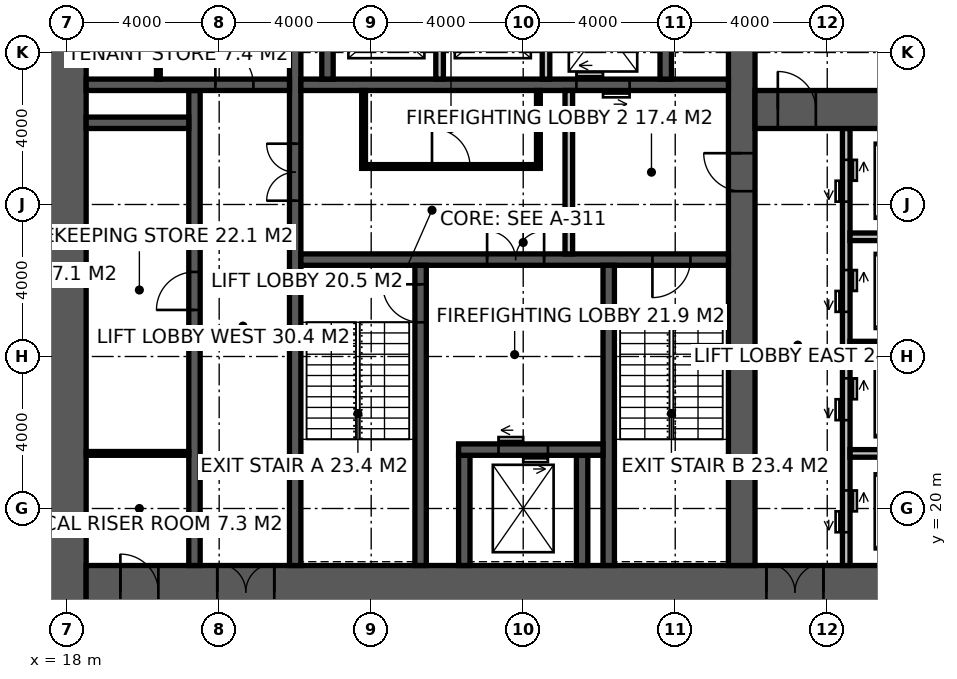
"""IFC4 building model, lengths in metres.
Left out: names, types, materials, properties, quantities, classifications, styles, units other than length and angle.
Written with IfcOpenShell. Run it as: python <this file> out.ifc"""

import sys

from ifc_helpers import new_model, si_unit, direction, frame, frame_2d, origin, place, context, subcontext, project, spatial, rectangle, extrude, element, fill, save


model = new_model("IFC4")
c1 = context("Model", 3, precision=1e-05, world=origin(), true_north=direction((0.0, 1.0)))
c2 = subcontext(c1, "Body", "Model", "MODEL_VIEW")
j1 = project(units=[si_unit("LENGTHUNIT", "METRE"), si_unit("PLANEANGLEUNIT", "RADIAN")], contexts=[c1])
p1 = place(None, origin())
s1 = spatial("IfcSite", under=j1, at=p1, CompositionType="ELEMENT")
p2 = place(p1, origin())
s2 = spatial("IfcBuilding", under=s1, at=p2, CompositionType="ELEMENT")
p3 = place(p2, frame((0.0, 0.0, 15.0)))
s3 = spatial("IfcBuildingStorey", under=s2, at=p3, CompositionType="ELEMENT", Elevation=15.0)
p4 = place(p3, frame((18.0, 17.1, -0.15), z_axis=(0.0, 0.0, 1.0), x_axis=(0.0, 1.0, 0.0)))
e1 = element("IfcWall", 1, at=p4, inside=s3, PredefinedType="SHEAR", context=c2, shape_type="SweptSolid", body=[
    extrude(rectangle(XDim=19.8, YDim=1.0, at=frame_2d((9.9, 0.0))), origin(), (0.0, 0.0, 1.0), 4.0),
])
p5 = place(p3, frame((18.5, 17.8, -0.15), z_axis=(0.0, 0.0, 1.0), x_axis=(1.0, 0.0, 0.0)))
e2 = element("IfcWall", 2, at=p5, inside=s3, PredefinedType="SHEAR", context=c2, shape_type="SweptSolid", body=[
    extrude(rectangle(XDim=23.0, YDim=1.4, at=frame_2d((11.5, 0.0))), origin(), (0.0, 0.0, 1.0), 4.0),
])
p6 = place(p5, frame((3.45, 0.0, 0.15)))
e3 = element("IfcOpeningElement", 3, at=p6, cuts=e2, PredefinedType="OPENING", context=c2, shape_type="SweptSolid", body=[
    extrude(rectangle(XDim=1.5, YDim=2.4, at=frame_2d((0.75, 1.2))), frame((0.0, 0.71, 0.0), z_axis=(0.0, -1.0, 0.0), x_axis=(1.0, 0.0, 0.0)), (0.0, 0.0, 1.0), 1.42),
])
p7 = place(p5, frame((17.9, 0.0, 0.15)))
e4 = element("IfcOpeningElement", 4, at=p7, cuts=e2, PredefinedType="OPENING", context=c2, shape_type="SweptSolid", body=[
    extrude(rectangle(XDim=1.5, YDim=2.4, at=frame_2d((0.75, 1.2))), frame((0.0, 0.71, 0.0), z_axis=(0.0, -1.0, 0.0), x_axis=(1.0, 0.0, 0.0)), (0.0, 0.0, 1.0), 1.42),
])
p8 = place(p5, frame((0.9, 0.0, 0.15)))
e5 = element("IfcOpeningElement", 5, at=p8, cuts=e2, PredefinedType="OPENING", context=c2, shape_type="SweptSolid", body=[
    extrude(rectangle(XDim=1.0, YDim=2.2, at=frame_2d((0.5, 1.1))), frame((0.0, 0.71, 0.0), z_axis=(0.0, -1.0, 0.0), x_axis=(1.0, 0.0, 0.0)), (0.0, 0.0, 1.0), 1.42),
])
p9 = place(p3, frame((35.75, 18.5, -0.15), z_axis=(0.0, 0.0, 1.0), x_axis=(0.0, 1.0, 0.0)))
e6 = element("IfcWall", 6, at=p9, inside=s3, PredefinedType="SHEAR", context=c2, shape_type="SweptSolid", body=[
    extrude(rectangle(XDim=17.0, YDim=0.7, at=frame_2d((8.5, 0.0))), origin(), (0.0, 0.0, 1.0), 4.0),
])
p10 = place(p9, frame((9.85, 0.0, 0.15)))
e7 = element("IfcOpeningElement", 7, at=p10, cuts=e6, PredefinedType="OPENING", context=c2, shape_type="SweptSolid", body=[
    extrude(rectangle(XDim=1.0, YDim=2.2, at=frame_2d((0.5, 1.1))), frame((0.0, 0.36, 0.0), z_axis=(0.0, -1.0, 0.0), x_axis=(1.0, 0.0, 0.0)), (0.0, 0.0, 1.0), 0.72),
])
p11 = place(p3, frame((24.0, 18.5, -0.15), z_axis=(0.0, 0.0, 1.0), x_axis=(0.0, 1.0, 0.0)))
e8 = element("IfcWall", 8, at=p11, inside=s3, PredefinedType="SHEAR", context=c2, shape_type="SweptSolid", body=[
    extrude(rectangle(XDim=17.0, YDim=0.3, at=frame_2d((8.5, 0.0))), origin(), (0.0, 0.0, 1.0), 4.0),
])
p12 = place(p11, frame((9.6, 0.0, 0.15)))
e9 = element("IfcOpeningElement", 9, at=p12, cuts=e8, PredefinedType="OPENING", context=c2, shape_type="SweptSolid", body=[
    extrude(rectangle(XDim=1.5, YDim=2.4, at=frame_2d((0.75, 1.2))), frame((0.0, 0.16, 0.0), z_axis=(0.0, -1.0, 0.0), x_axis=(1.0, 0.0, 0.0)), (0.0, 0.0, 1.0), 0.32),
])
p13 = place(p3, frame((24.15, 26.55, -0.15), z_axis=(0.0, 0.0, 1.0), x_axis=(1.0, 0.0, 0.0)))
e10 = element("IfcWall", 10, at=p13, inside=s3, PredefinedType="SHEAR", context=c2, shape_type="SweptSolid", body=[
    extrude(rectangle(XDim=11.25, YDim=0.3, at=frame_2d((5.625, 0.0))), origin(), (0.0, 0.0, 1.0), 4.0),
])
p14 = place(p13, frame((9.25, 0.0, 0.15)))
e11 = element("IfcOpeningElement", 11, at=p14, cuts=e10, PredefinedType="OPENING", context=c2, shape_type="SweptSolid", body=[
    extrude(rectangle(XDim=1.0, YDim=2.2, at=frame_2d((0.5, 1.1))), frame((0.0, 0.16, 0.0), z_axis=(0.0, -1.0, 0.0), x_axis=(1.0, 0.0, 0.0)), (0.0, 0.0, 1.0), 0.32),
])
p15 = place(p13, frame((4.9, 0.0, 0.15)))
e12 = element("IfcOpeningElement", 12, at=p15, cuts=e10, PredefinedType="OPENING", context=c2, shape_type="SweptSolid", body=[
    extrude(rectangle(XDim=1.5, YDim=2.4, at=frame_2d((0.75, 1.2))), frame((0.0, 0.16, 0.0), z_axis=(0.0, -1.0, 0.0), x_axis=(1.0, 0.0, 0.0)), (0.0, 0.0, 1.0), 0.32),
])
p16 = place(p3, frame((27.3, 18.5, -0.15), z_axis=(0.0, 0.0, 1.0), x_axis=(0.0, 1.0, 0.0)))
e13 = element("IfcWall", 13, at=p16, inside=s3, PredefinedType="SHEAR", context=c2, shape_type="SweptSolid", body=[
    extrude(rectangle(XDim=7.9, YDim=0.3, at=frame_2d((3.95, 0.0))), origin(), (0.0, 0.0, 1.0), 4.0),
])
p17 = place(p16, frame((6.4, 0.0, 0.15)))
e14 = element("IfcOpeningElement", 14, at=p17, cuts=e13, PredefinedType="OPENING", context=c2, shape_type="SweptSolid", body=[
    extrude(rectangle(XDim=1.0, YDim=2.2, at=frame_2d((0.5, 1.1))), frame((0.0, 0.16, 0.0), z_axis=(0.0, -1.0, 0.0), x_axis=(1.0, 0.0, 0.0)), (0.0, 0.0, 1.0), 0.32),
])
p18 = place(p3, frame((32.25, 18.5, -0.15), z_axis=(0.0, 0.0, 1.0), x_axis=(0.0, 1.0, 0.0)))
e15 = element("IfcWall", 15, at=p18, inside=s3, PredefinedType="SHEAR", context=c2, shape_type="SweptSolid", body=[
    extrude(rectangle(XDim=7.9, YDim=0.3, at=frame_2d((3.95, 0.0))), origin(), (0.0, 0.0, 1.0), 4.0),
])
for number, where, z_axis, x_axis in (
    (16, (28.45, 18.5, -0.15), (0.0, 0.0, 1.0), (0.0, 1.0, 0.0)),
    (17, (31.55, 18.5, -0.15), (0.0, 0.0, 1.0), (0.0, 1.0, 0.0)),
):
    element("IfcWall", number, at=place(p3, frame(where, z_axis=z_axis, x_axis=x_axis)), inside=s3, PredefinedType="SHEAR", context=c2, shape_type="SweptSolid", body=[
        extrude(rectangle(XDim=2.9, YDim=0.3, at=frame_2d((1.45, 0.0))), origin(), (0.0, 0.0, 1.0), 4.0),
    ])
p19 = place(p3, frame((28.3, 21.55, -0.15), z_axis=(0.0, 0.0, 1.0), x_axis=(1.0, 0.0, 0.0)))
e18 = element("IfcWall", 18, at=p19, inside=s3, PredefinedType="SHEAR", context=c2, shape_type="SweptSolid", body=[
    extrude(rectangle(XDim=3.8, YDim=0.3, at=frame_2d((1.9, 0.0))), origin(), (0.0, 0.0, 1.0), 4.0),
])
p20 = place(p19, frame((1.05, 0.0, 0.15)))
e19 = element("IfcOpeningElement", 19, at=p20, cuts=e18, PredefinedType="OPENING", context=c2, shape_type="SweptSolid", body=[
    extrude(rectangle(XDim=1.3, YDim=2.4, at=frame_2d((0.65, 1.2))), frame((0.0, 0.16, 0.0), z_axis=(0.0, -1.0, 0.0), x_axis=(1.0, 0.0, 0.0)), (0.0, 0.0, 1.0), 0.32),
])
p21 = place(p3, frame((24.15, 31.15, -0.15), z_axis=(0.0, 0.0, 1.0), x_axis=(1.0, 0.0, 0.0)))
e20 = element("IfcWall", 20, at=p21, inside=s3, PredefinedType="SHEAR", context=c2, shape_type="SweptSolid", body=[
    extrude(rectangle(XDim=11.25, YDim=0.3, at=frame_2d((5.625, 0.0))), origin(), (0.0, 0.0, 1.0), 4.0),
])
p22 = place(p21, frame((7.25, 0.0, 0.15)))
e21 = element("IfcOpeningElement", 21, at=p22, cuts=e20, PredefinedType="OPENING", context=c2, shape_type="SweptSolid", body=[
    extrude(rectangle(XDim=1.4, YDim=2.4, at=frame_2d((0.7, 1.2))), frame((0.0, 0.16, 0.0), z_axis=(0.0, -1.0, 0.0), x_axis=(1.0, 0.0, 0.0)), (0.0, 0.0, 1.0), 0.32),
])
p23 = place(p3, frame((21.35, 18.5, -0.15), z_axis=(0.0, 0.0, 1.0), x_axis=(0.0, 1.0, 0.0)))
e22 = element("IfcWall", 22, at=p23, inside=s3, PredefinedType="SHEAR", context=c2, shape_type="SweptSolid", body=[
    extrude(rectangle(XDim=12.5, YDim=0.3, at=frame_2d((6.25, 0.0))), origin(), (0.0, 0.0, 1.0), 4.0),
])
p24 = place(p23, frame((6.725, 0.0, 0.15)))
e23 = element("IfcOpeningElement", 23, at=p24, cuts=e22, PredefinedType="OPENING", context=c2, shape_type="SweptSolid", body=[
    extrude(rectangle(XDim=1.0, YDim=2.2, at=frame_2d((0.5, 1.1))), frame((0.0, 0.16, 0.0), z_axis=(0.0, -1.0, 0.0), x_axis=(1.0, 0.0, 0.0)), (0.0, 0.0, 1.0), 0.32),
])
p25 = place(p3, frame((18.5, 31.15, -0.15), z_axis=(0.0, 0.0, 1.0), x_axis=(1.0, 0.0, 0.0)))
e24 = element("IfcWall", 24, at=p25, inside=s3, PredefinedType="SHEAR", context=c2, shape_type="SweptSolid", body=[
    extrude(rectangle(XDim=5.35, YDim=0.3, at=frame_2d((2.675, 0.0))), origin(), (0.0, 0.0, 1.0), 4.0),
])
p26 = place(p25, frame((3.4, 0.0, 0.15)))
e25 = element("IfcOpeningElement", 25, at=p26, cuts=e24, PredefinedType="OPENING", context=c2, shape_type="SweptSolid", body=[
    extrude(rectangle(XDim=1.0, YDim=2.2, at=frame_2d((0.5, 1.1))), frame((0.0, 0.16, 0.0), z_axis=(0.0, -1.0, 0.0), x_axis=(1.0, 0.0, 0.0)), (0.0, 0.0, 1.0), 0.32),
])
p27 = place(p3, frame((18.5, 30.15, -0.15), z_axis=(0.0, 0.0, 1.0), x_axis=(1.0, 0.0, 0.0)))
e26 = element("IfcWall", 26, at=p27, inside=s3, PredefinedType="SHEAR", context=c2, shape_type="SweptSolid", body=[
    extrude(rectangle(XDim=2.7, YDim=0.3, at=frame_2d((1.35, 0.0))), origin(), (0.0, 0.0, 1.0), 4.0),
])
for number, where, z_axis, x_axis in (
    (27, (24.85, 31.3, -0.15), (0.0, 0.0, 1.0), (0.0, 1.0, 0.0)),
    (28, (33.75, 31.3, -0.15), (0.0, 0.0, 1.0), (0.0, 1.0, 0.0)),
):
    element("IfcWall", number, at=place(p3, frame(where, z_axis=z_axis, x_axis=x_axis)), inside=s3, PredefinedType="SHEAR", context=c2, shape_type="SweptSolid", body=[
        extrude(rectangle(XDim=4.2, YDim=0.3, at=frame_2d((2.1, 0.0))), origin(), (0.0, 0.0, 1.0), 4.0),
    ])
for number, where, z_axis, x_axis in (
    (29, (27.8, 31.3, -0.15), (0.0, 0.0, 1.0), (0.0, 1.0, 0.0)),
    (30, (30.6, 31.3, -0.15), (0.0, 0.0, 1.0), (0.0, 1.0, 0.0)),
):
    element("IfcWall", number, at=place(p3, frame(where, z_axis=z_axis, x_axis=x_axis)), inside=s3, PredefinedType="SOLIDWALL", context=c2, shape_type="SweptSolid", body=[
        extrude(rectangle(XDim=2.8, YDim=0.2, at=frame_2d((1.4, 0.0))), origin(), (0.0, 0.0, 1.0), 4.0),
    ])
p28 = place(p3, frame((38.5, 18.5, -0.15), z_axis=(0.0, 0.0, 1.0), x_axis=(0.0, 1.0, 0.0)))
e31 = element("IfcWall", 31, at=p28, inside=s3, PredefinedType="SOLIDWALL", context=c2, shape_type="SweptSolid", body=[
    extrude(rectangle(XDim=11.5, YDim=0.2, at=frame_2d((5.75, 0.0))), origin(), (0.0, 0.0, 1.0), 4.0),
])
p29 = place(p28, frame((0.875, 0.0, 0.15)))
e32 = element("IfcOpeningElement", 32, at=p29, cuts=e31, PredefinedType="OPENING", context=c2, shape_type="SweptSolid", body=[
    extrude(rectangle(XDim=1.1, YDim=2.2, at=frame_2d((0.55, 1.1))), frame((0.0, 0.11, 0.0), z_axis=(0.0, -1.0, 0.0), x_axis=(1.0, 0.0, 0.0)), (0.0, 0.0, 1.0), 0.22),
])
p30 = place(p28, frame((3.825, 0.0, 0.15)))
e33 = element("IfcOpeningElement", 33, at=p30, cuts=e31, PredefinedType="OPENING", context=c2, shape_type="SweptSolid", body=[
    extrude(rectangle(XDim=1.1, YDim=2.2, at=frame_2d((0.55, 1.1))), frame((0.0, 0.11, 0.0), z_axis=(0.0, -1.0, 0.0), x_axis=(1.0, 0.0, 0.0)), (0.0, 0.0, 1.0), 0.22),
])
p31 = place(p28, frame((6.675, 0.0, 0.15)))
e34 = element("IfcOpeningElement", 34, at=p31, cuts=e31, PredefinedType="OPENING", context=c2, shape_type="SweptSolid", body=[
    extrude(rectangle(XDim=1.1, YDim=2.2, at=frame_2d((0.55, 1.1))), frame((0.0, 0.11, 0.0), z_axis=(0.0, -1.0, 0.0), x_axis=(1.0, 0.0, 0.0)), (0.0, 0.0, 1.0), 0.22),
])
p32 = place(p28, frame((9.575, 0.0, 0.15)))
e35 = element("IfcOpeningElement", 35, at=p32, cuts=e31, PredefinedType="OPENING", context=c2, shape_type="SweptSolid", body=[
    extrude(rectangle(XDim=1.1, YDim=2.2, at=frame_2d((0.55, 1.1))), frame((0.0, 0.11, 0.0), z_axis=(0.0, -1.0, 0.0), x_axis=(1.0, 0.0, 0.0)), (0.0, 0.0, 1.0), 0.22),
])
p33 = place(p3, frame((36.1, 30.5, -0.15), z_axis=(0.0, 0.0, 1.0), x_axis=(1.0, 0.0, 0.0)))
e36 = element("IfcWall", 36, at=p33, inside=s3, PredefinedType="SHEAR", context=c2, shape_type="SweptSolid", body=[
    extrude(rectangle(XDim=5.4, YDim=1.0, at=frame_2d((2.7, 0.0))), origin(), (0.0, 0.0, 1.0), 4.0),
])
p34 = place(p33, frame((0.6, 0.0, 0.15)))
e37 = element("IfcOpeningElement", 37, at=p34, cuts=e36, PredefinedType="OPENING", context=c2, shape_type="SweptSolid", body=[
    extrude(rectangle(XDim=1.0, YDim=2.2, at=frame_2d((0.5, 1.1))), frame((0.0, 0.51, 0.0), z_axis=(0.0, -1.0, 0.0), x_axis=(1.0, 0.0, 0.0)), (0.0, 0.0, 1.0), 1.02),
])
for number, where, z_axis, x_axis in (
    (38, (38.6, 21.45, -0.15), (0.0, 0.0, 1.0), (1.0, 0.0, 0.0)),
    (39, (38.6, 24.3, -0.15), (0.0, 0.0, 1.0), (1.0, 0.0, 0.0)),
    (40, (38.6, 27.15, -0.15), (0.0, 0.0, 1.0), (1.0, 0.0, 0.0)),
):
    element("IfcWall", number, at=place(p3, frame(where, z_axis=z_axis, x_axis=x_axis)), inside=s3, PredefinedType="SOLIDWALL", context=c2, shape_type="SweptSolid", body=[
        extrude(rectangle(XDim=2.9, YDim=0.2, at=frame_2d((1.45, 0.0))), origin(), (0.0, 0.0, 1.0), 4.0),
    ])
p35 = place(p3, frame((31.2, 26.7, 0.0), z_axis=(0.0, 0.0, 1.0), x_axis=(0.0, 1.0, 0.0)))
e41 = element("IfcWall", 41, at=p35, inside=s3, PredefinedType="SOLIDWALL", context=c2, shape_type="SweptSolid", body=[
    extrude(rectangle(XDim=4.3, YDim=0.2, at=frame_2d((2.15, 0.0))), origin(), (0.0, 0.0, 1.0), 3.85),
])
p36 = place(p3, frame((20.4, 31.3, 0.0), z_axis=(0.0, 0.0, 1.0), x_axis=(0.0, 1.0, 0.0)))
e42 = element("IfcWall", 42, at=p36, inside=s3, PredefinedType="PARTITIONING", context=c2, shape_type="SweptSolid", body=[
    extrude(rectangle(XDim=4.2, YDim=0.1, at=frame_2d((2.1, 0.0))), origin(), (0.0, 0.0, 1.0), 3.85),
])
p37 = place(p36, frame((1.55, 0.0, 0.0)))
e43 = element("IfcOpeningElement", 43, at=p37, cuts=e42, PredefinedType="OPENING", context=c2, shape_type="SweptSolid", body=[
    extrude(rectangle(XDim=1.0, YDim=2.2, at=frame_2d((0.5, 1.1))), frame((0.0, 0.06, 0.0), z_axis=(0.0, -1.0, 0.0), x_axis=(1.0, 0.0, 0.0)), (0.0, 0.0, 1.0), 0.12),
])
p38 = place(p3, frame((25.75, 29.0, 0.0), z_axis=(0.0, 0.0, 1.0), x_axis=(1.0, 0.0, 0.0)))
e44 = element("IfcWall", 44, at=p38, inside=s3, PredefinedType="PARTITIONING", context=c2, shape_type="SweptSolid", body=[
    extrude(rectangle(XDim=4.7, YDim=0.1, at=frame_2d((2.35, 0.0))), origin(), (0.0, 0.0, 1.0), 3.85),
])
p39 = place(p38, frame((1.85, 0.0, 0.0)))
e45 = element("IfcOpeningElement", 45, at=p39, cuts=e44, PredefinedType="OPENING", context=c2, shape_type="SweptSolid", body=[
    extrude(rectangle(XDim=1.0, YDim=2.2, at=frame_2d((0.5, 1.1))), frame((0.0, 0.06, 0.0), z_axis=(0.0, -1.0, 0.0), x_axis=(1.0, 0.0, 0.0)), (0.0, 0.0, 1.0), 0.12),
])
for number, where, z_axis, x_axis in (
    (46, (25.8, 29.05, 0.0), (0.0, 0.0, 1.0), (0.0, 1.0, 0.0)),
    (47, (30.4, 29.05, 0.0), (0.0, 0.0, 1.0), (0.0, 1.0, 0.0)),
):
    element("IfcWall", number, at=place(p3, frame(where, z_axis=z_axis, x_axis=x_axis)), inside=s3, PredefinedType="PARTITIONING", context=c2, shape_type="SweptSolid", body=[
        extrude(rectangle(XDim=1.95, YDim=0.1, at=frame_2d((0.975, 0.0))), origin(), (0.0, 0.0, 1.0), 3.85),
    ])
p40 = place(p3, frame((18.5, 21.45, 0.0), z_axis=(0.0, 0.0, 1.0), x_axis=(1.0, 0.0, 0.0)))
e48 = element("IfcWall", 48, at=p40, inside=s3, PredefinedType="PARTITIONING", context=c2, shape_type="SweptSolid", body=[
    extrude(rectangle(XDim=2.7, YDim=0.1, at=frame_2d((1.35, 0.0))), origin(), (0.0, 0.0, 1.0), 3.85),
])
p41 = place(p17, origin())
e49 = element("IfcDoor", 49, at=p41, inside=s3, OperationType="SINGLE_SWING_RIGHT", PredefinedType="DOOR", context=c2, shape_type="SweptSolid", body=[
    extrude(rectangle(XDim=1.0, YDim=2.2, at=frame_2d((0.5, 1.1))), frame((0.0, 0.025, 0.0), z_axis=(0.0, -1.0, 0.0), x_axis=(1.0, 0.0, 0.0)), (0.0, 0.0, 1.0), 0.05),
])
fill(e14, e49)
p42 = place(p14, frame((1.0, 0.0, 0.0), z_axis=(0.0, 0.0, 1.0), x_axis=(-1.0, 0.0, 0.0)))
e50 = element("IfcDoor", 50, at=p42, inside=s3, OperationType="SINGLE_SWING_RIGHT", PredefinedType="DOOR", context=c2, shape_type="SweptSolid", body=[
    extrude(rectangle(XDim=1.0, YDim=2.2, at=frame_2d((0.5, 1.1))), frame((0.0, 0.025, 0.0), z_axis=(0.0, -1.0, 0.0), x_axis=(1.0, 0.0, 0.0)), (0.0, 0.0, 1.0), 0.05),
])
fill(e11, e50)
p43 = place(p10, origin())
e51 = element("IfcDoor", 51, at=p43, inside=s3, OperationType="SINGLE_SWING_RIGHT", PredefinedType="DOOR", context=c2, shape_type="SweptSolid", body=[
    extrude(rectangle(XDim=1.0, YDim=2.2, at=frame_2d((0.5, 1.1))), frame((0.0, 0.025, 0.0), z_axis=(0.0, -1.0, 0.0), x_axis=(1.0, 0.0, 0.0)), (0.0, 0.0, 1.0), 0.05),
])
fill(e7, e51)
p44 = place(p15, origin())
e52 = element("IfcDoor", 52, at=p44, inside=s3, OperationType="DOUBLE_DOOR_DOUBLE_SWING", PredefinedType="DOOR", context=c2, shape_type="SweptSolid", body=[
    extrude(rectangle(XDim=1.5, YDim=2.4, at=frame_2d((0.75, 1.2))), frame((0.0, 0.025, 0.0), z_axis=(0.0, -1.0, 0.0), x_axis=(1.0, 0.0, 0.0)), (0.0, 0.0, 1.0), 0.05),
])
fill(e12, e52)
p45 = place(p12, origin())
e53 = element("IfcDoor", 53, at=p45, inside=s3, OperationType="DOUBLE_DOOR_DOUBLE_SWING", PredefinedType="DOOR", context=c2, shape_type="SweptSolid", body=[
    extrude(rectangle(XDim=1.5, YDim=2.4, at=frame_2d((0.75, 1.2))), frame((0.0, 0.025, 0.0), z_axis=(0.0, -1.0, 0.0), x_axis=(1.0, 0.0, 0.0)), (0.0, 0.0, 1.0), 0.05),
])
fill(e9, e53)
p46 = place(p26, origin())
e54 = element("IfcDoor", 54, at=p46, inside=s3, OperationType="SINGLE_SWING_LEFT", PredefinedType="DOOR", context=c2, shape_type="SweptSolid", body=[
    extrude(rectangle(XDim=1.0, YDim=2.2, at=frame_2d((0.5, 1.1))), frame((0.0, 0.025, 0.0), z_axis=(0.0, -1.0, 0.0), x_axis=(1.0, 0.0, 0.0)), (0.0, 0.0, 1.0), 0.05),
])
fill(e25, e54)
p47 = place(p39, origin())
e55 = element("IfcDoor", 55, at=p47, inside=s3, OperationType="SINGLE_SWING_LEFT", PredefinedType="DOOR", context=c2, shape_type="SweptSolid", body=[
    extrude(rectangle(XDim=1.0, YDim=2.2, at=frame_2d((0.5, 1.1))), frame((0.0, 0.025, 0.0), z_axis=(0.0, -1.0, 0.0), x_axis=(1.0, 0.0, 0.0)), (0.0, 0.0, 1.0), 0.05),
])
fill(e45, e55)
p48 = place(p24, origin())
e56 = element("IfcDoor", 56, at=p48, inside=s3, OperationType="SINGLE_SWING_LEFT", PredefinedType="DOOR", context=c2, shape_type="SweptSolid", body=[
    extrude(rectangle(XDim=1.0, YDim=2.2, at=frame_2d((0.5, 1.1))), frame((0.0, 0.025, 0.0), z_axis=(0.0, -1.0, 0.0), x_axis=(1.0, 0.0, 0.0)), (0.0, 0.0, 1.0), 0.05),
])
fill(e23, e56)
p49 = place(p6, origin())
e57 = element("IfcDoor", 57, at=p49, inside=s3, OperationType="DOUBLE_DOOR_DOUBLE_SWING", PredefinedType="DOOR", context=c2, shape_type="SweptSolid", body=[
    extrude(rectangle(XDim=1.5, YDim=2.4, at=frame_2d((0.75, 1.2))), frame((0.0, 0.025, 0.0), z_axis=(0.0, -1.0, 0.0), x_axis=(1.0, 0.0, 0.0)), (0.0, 0.0, 1.0), 0.05),
])
fill(e3, e57)
p50 = place(p7, origin())
e58 = element("IfcDoor", 58, at=p50, inside=s3, OperationType="DOUBLE_DOOR_DOUBLE_SWING", PredefinedType="DOOR", context=c2, shape_type="SweptSolid", body=[
    extrude(rectangle(XDim=1.5, YDim=2.4, at=frame_2d((0.75, 1.2))), frame((0.0, 0.025, 0.0), z_axis=(0.0, -1.0, 0.0), x_axis=(1.0, 0.0, 0.0)), (0.0, 0.0, 1.0), 0.05),
])
fill(e4, e58)
p51 = place(p34, origin())
e59 = element("IfcDoor", 59, at=p51, inside=s3, OperationType="SINGLE_SWING_LEFT", PredefinedType="DOOR", context=c2, shape_type="SweptSolid", body=[
    extrude(rectangle(XDim=1.0, YDim=2.2, at=frame_2d((0.5, 1.1))), frame((0.0, 0.025, 0.0), z_axis=(0.0, -1.0, 0.0), x_axis=(1.0, 0.0, 0.0)), (0.0, 0.0, 1.0), 0.05),
])
fill(e37, e59)
p52 = place(p8, origin())
e60 = element("IfcDoor", 60, at=p52, inside=s3, OperationType="SINGLE_SWING_LEFT", PredefinedType="DOOR", context=c2, shape_type="SweptSolid", body=[
    extrude(rectangle(XDim=1.0, YDim=2.2, at=frame_2d((0.5, 1.1))), frame((0.0, 0.025, 0.0), z_axis=(0.0, -1.0, 0.0), x_axis=(1.0, 0.0, 0.0)), (0.0, 0.0, 1.0), 0.05),
])
fill(e5, e60)
p53 = place(p20, origin())
e61 = element("IfcDoor", 61, at=p53, inside=s3, OperationType="DOUBLE_DOOR_SLIDING", PredefinedType="DOOR", context=c2, shape_type="SweptSolid", body=[
    extrude(rectangle(XDim=1.3, YDim=2.4, at=frame_2d((0.65, 1.2))), frame((0.0, 0.025, 0.0), z_axis=(0.0, -1.0, 0.0), x_axis=(1.0, 0.0, 0.0)), (0.0, 0.0, 1.0), 0.05),
])
fill(e19, e61)
p54 = place(p22, origin())
e62 = element("IfcDoor", 62, at=p54, inside=s3, OperationType="DOUBLE_DOOR_SLIDING", PredefinedType="DOOR", context=c2, shape_type="SweptSolid", body=[
    extrude(rectangle(XDim=1.4, YDim=2.4, at=frame_2d((0.7, 1.2))), frame((0.0, 0.025, 0.0), z_axis=(0.0, -1.0, 0.0), x_axis=(1.0, 0.0, 0.0)), (0.0, 0.0, 1.0), 0.05),
])
fill(e21, e62)
p55 = place(p29, origin())
e63 = element("IfcDoor", 63, at=p55, inside=s3, OperationType="DOUBLE_DOOR_SLIDING", PredefinedType="DOOR", context=c2, shape_type="SweptSolid", body=[
    extrude(rectangle(XDim=1.1, YDim=2.2, at=frame_2d((0.55, 1.1))), frame((0.0, 0.025, 0.0), z_axis=(0.0, -1.0, 0.0), x_axis=(1.0, 0.0, 0.0)), (0.0, 0.0, 1.0), 0.05),
])
fill(e32, e63)
p56 = place(p30, origin())
e64 = element("IfcDoor", 64, at=p56, inside=s3, OperationType="DOUBLE_DOOR_SLIDING", PredefinedType="DOOR", context=c2, shape_type="SweptSolid", body=[
    extrude(rectangle(XDim=1.1, YDim=2.2, at=frame_2d((0.55, 1.1))), frame((0.0, 0.025, 0.0), z_axis=(0.0, -1.0, 0.0), x_axis=(1.0, 0.0, 0.0)), (0.0, 0.0, 1.0), 0.05),
])
fill(e33, e64)
p57 = place(p31, origin())
e65 = element("IfcDoor", 65, at=p57, inside=s3, OperationType="DOUBLE_DOOR_SLIDING", PredefinedType="DOOR", context=c2, shape_type="SweptSolid", body=[
    extrude(rectangle(XDim=1.1, YDim=2.2, at=frame_2d((0.55, 1.1))), frame((0.0, 0.025, 0.0), z_axis=(0.0, -1.0, 0.0), x_axis=(1.0, 0.0, 0.0)), (0.0, 0.0, 1.0), 0.05),
])
fill(e34, e65)
p58 = place(p32, origin())
e66 = element("IfcDoor", 66, at=p58, inside=s3, OperationType="DOUBLE_DOOR_SLIDING", PredefinedType="DOOR", context=c2, shape_type="SweptSolid", body=[
    extrude(rectangle(XDim=1.1, YDim=2.2, at=frame_2d((0.55, 1.1))), frame((0.0, 0.025, 0.0), z_axis=(0.0, -1.0, 0.0), x_axis=(1.0, 0.0, 0.0)), (0.0, 0.0, 1.0), 0.05),
])
fill(e35, e66)
save(model, sys.argv[1])
